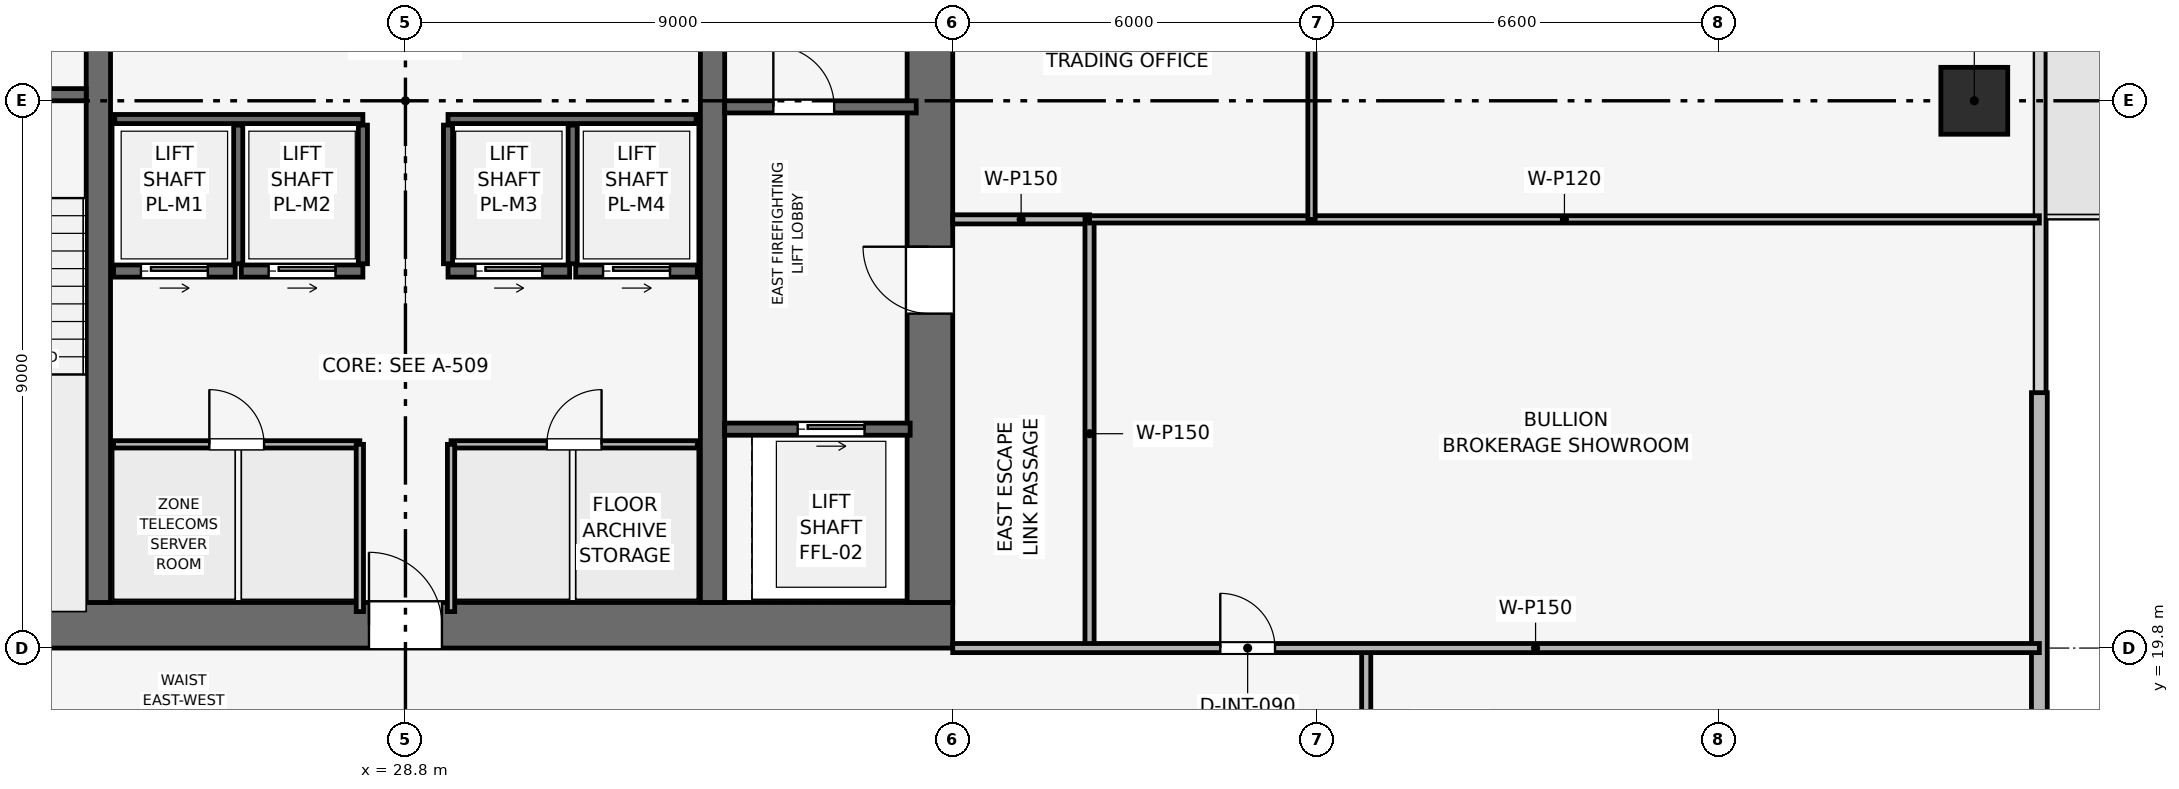
"""IFC4 building model, lengths in metres.
Left out: names, types, materials, properties, quantities, classifications, styles, units other than length and angle.
Written with IfcOpenShell. Run it as: python <this file> out.ifc"""

import sys

from ifc_helpers import new_model, si_unit, direction, frame, frame_2d, origin, origin_2d, place, context, subcontext, project, spatial, rectangle, extrude, element, fill, save


model = new_model("IFC4")
c1 = context("Model", 3, precision=1e-05, world=origin(), true_north=direction((0.0, 1.0)))
c2 = subcontext(c1, "Body", "Model", "MODEL_VIEW")
j1 = project(units=[si_unit("LENGTHUNIT", "METRE"), si_unit("PLANEANGLEUNIT", "RADIAN")], contexts=[c1])
p1 = place(None, origin())
s1 = spatial("IfcSite", under=j1, at=p1, CompositionType="ELEMENT")
p2 = place(p1, origin())
s2 = spatial("IfcBuilding", under=s1, at=p2, CompositionType="ELEMENT")
p3 = place(p2, frame((0.0, 0.0, 214.95)))
s3 = spatial("IfcBuildingStorey", under=s2, at=p3, CompositionType="ELEMENT", Elevation=214.95)
p4 = place(p3, frame((19.8, 20.175, 0.0), z_axis=(0.0, 0.0, 1.0), x_axis=(1.0, 0.0, 0.0)))
e1 = element("IfcWall", 1, at=p4, inside=s3, PredefinedType="SHEAR", context=c2, shape_type="SweptSolid", body=[
    extrude(rectangle(XDim=18.0, YDim=0.75, at=frame_2d((9.0, 0.0))), origin(), (0.0, 0.0, 1.0), 3.75),
])
p5 = place(p4, frame((8.4, 0.0, 0.0)))
e2 = element("IfcOpeningElement", 2, at=p5, cuts=e1, PredefinedType="OPENING", context=c2, shape_type="SweptSolid", body=[
    extrude(rectangle(XDim=1.2, YDim=2.2, at=frame_2d((0.6, 1.1))), frame((0.0, 0.385, 0.0), z_axis=(0.0, -1.0, 0.0), x_axis=(1.0, 0.0, 0.0)), (0.0, 0.0, 1.0), 0.77),
])
p6 = place(p3, frame((37.425, 20.55, 0.0), z_axis=(0.0, 0.0, 1.0), x_axis=(0.0, 1.0, 0.0)))
e3 = element("IfcWall", 3, at=p6, inside=s3, PredefinedType="SHEAR", context=c2, shape_type="SweptSolid", body=[
    extrude(rectangle(XDim=16.5, YDim=0.75, at=frame_2d((8.25, 0.0))), origin(), (0.0, 0.0, 1.0), 3.75),
])
p7 = place(p6, frame((4.75, 0.0, 0.0)))
e4 = element("IfcOpeningElement", 4, at=p7, cuts=e3, PredefinedType="OPENING", context=c2, shape_type="SweptSolid", body=[
    extrude(rectangle(XDim=1.1, YDim=2.15, at=frame_2d((0.55, 1.075))), frame((0.0, 0.385, 0.0), z_axis=(0.0, -1.0, 0.0), x_axis=(1.0, 0.0, 0.0)), (0.0, 0.0, 1.0), 0.77),
])
for number, where, z_axis, x_axis in (
    (5, (23.75, 20.55, 0.0), (0.0, 0.0, 1.0), (0.0, 1.0, 0.0)),
    (6, (33.85, 20.55, 0.0), (0.0, 0.0, 1.0), (0.0, 1.0, 0.0)),
):
    element("IfcWall", number, at=place(p3, frame(where, z_axis=z_axis, x_axis=x_axis)), inside=s3, PredefinedType="SHEAR", context=c2, shape_type="SweptSolid", body=[
        extrude(rectangle(XDim=16.5, YDim=0.4, at=frame_2d((8.25, 0.0))), origin(), (0.0, 0.0, 1.0), 3.75),
    ])
p8 = place(p3, frame((54.6, 28.8, 0.003), z_axis=(0.0, 0.0, 1.0), x_axis=(1.0, 0.0, 0.0)))
e7 = element("IfcColumn", 7, at=p8, inside=s3, PredefinedType="COLUMN", context=c2, shape_type="SweptSolid", body=[
    extrude(rectangle(XDim=1.1, YDim=1.1, at=origin_2d()), origin(), (0.0, 0.0, 1.0), 3.494),
])
p9 = place(p3, frame((55.67, 24.0, 0.0), z_axis=(0.0, 0.0, 1.0), x_axis=(0.0, -1.0, 0.0)))
e8 = element("IfcWall", 8, at=p9, inside=s3, PredefinedType="SOLIDWALL", context=c2, shape_type="SweptSolid", body=[
    extrude(rectangle(XDim=14.7, YDim=0.26, at=frame_2d((7.35, 0.0))), origin(), (0.0, 0.0, 1.0), 3.5),
])
p10 = place(p9, frame((10.65, 0.0, 0.9)))
e9 = element("IfcOpeningElement", 9, at=p10, cuts=e8, PredefinedType="OPENING", context=c2, shape_type="SweptSolid", body=[
    extrude(rectangle(XDim=3.8, YDim=1.9, at=frame_2d((1.9, 0.95))), frame((0.0, 0.14, 0.0), z_axis=(0.0, -1.0, 0.0), x_axis=(1.0, 0.0, 0.0)), (0.0, 0.0, 1.0), 0.28),
])
p11 = place(p3, frame((20.4, 28.9, 0.0), z_axis=(0.0, 0.0, 1.0), x_axis=(1.0, 0.0, 0.0)))
e10 = element("IfcWall", 10, at=p11, inside=s3, PredefinedType="SHEAR", context=c2, shape_type="SweptSolid", body=[
    extrude(rectangle(XDim=3.15, YDim=0.2, at=frame_2d((1.575, 0.0))), origin(), (0.0, 0.0, 1.0), 3.5),
])
p12 = place(p11, frame((0.8, 0.0, 0.0)))
e11 = element("IfcOpeningElement", 11, at=p12, cuts=e10, PredefinedType="OPENING", context=c2, shape_type="SweptSolid", body=[
    extrude(rectangle(XDim=1.0, YDim=2.1, at=frame_2d((0.5, 1.05))), frame((0.0, 0.11, 0.0), z_axis=(0.0, -1.0, 0.0), x_axis=(1.0, 0.0, 0.0)), (0.0, 0.0, 1.0), 0.22),
])
p13 = place(p3, frame((34.05, 28.7, 0.0), z_axis=(0.0, 0.0, 1.0), x_axis=(1.0, 0.0, 0.0)))
e12 = element("IfcWall", 12, at=p13, inside=s3, PredefinedType="SHEAR", context=c2, shape_type="SweptSolid", body=[
    extrude(rectangle(XDim=3.15, YDim=0.2, at=frame_2d((1.575, 0.0))), origin(), (0.0, 0.0, 1.0), 3.5),
])
p14 = place(p13, frame((0.8, 0.0, 0.0)))
e13 = element("IfcOpeningElement", 13, at=p14, cuts=e12, PredefinedType="OPENING", context=c2, shape_type="SweptSolid", body=[
    extrude(rectangle(XDim=1.0, YDim=2.1, at=frame_2d((0.5, 1.05))), frame((0.0, 0.11, 0.0), z_axis=(0.0, -1.0, 0.0), x_axis=(1.0, 0.0, 0.0)), (0.0, 0.0, 1.0), 0.22),
])
p15 = place(p3, frame((34.05, 23.4, 0.0), z_axis=(0.0, 0.0, 1.0), x_axis=(1.0, 0.0, 0.0)))
e14 = element("IfcWall", 14, at=p15, inside=s3, PredefinedType="SHEAR", context=c2, shape_type="SweptSolid", body=[
    extrude(rectangle(XDim=3.05, YDim=0.2, at=frame_2d((1.525, 0.0))), origin(), (0.0, 0.0, 1.0), 3.5),
])
p16 = place(p15, frame((1.2, 0.0, 0.0)))
e15 = element("IfcOpeningElement", 15, at=p16, cuts=e14, PredefinedType="OPENING", context=c2, shape_type="SweptSolid", body=[
    extrude(rectangle(XDim=1.1, YDim=2.15, at=frame_2d((0.55, 1.075))), frame((0.0, 0.11, 0.0), z_axis=(0.0, -1.0, 0.0), x_axis=(1.0, 0.0, 0.0)), (0.0, 0.0, 1.0), 0.22),
])
p17 = place(p3, frame((24.0, 26.0, 0.0), z_axis=(0.0, 0.0, 1.0), x_axis=(1.0, 0.0, 0.0)))
e16 = element("IfcWall", 16, at=p17, inside=s3, PredefinedType="SHEAR", context=c2, shape_type="SweptSolid", body=[
    extrude(rectangle(XDim=2.0, YDim=0.2, at=frame_2d((1.0, 0.0))), origin(), (0.0, 0.0, 1.0), 3.5),
])
p18 = place(p17, frame((0.45, 0.0, 0.0)))
e17 = element("IfcOpeningElement", 17, at=p18, cuts=e16, PredefinedType="OPENING", context=c2, shape_type="SweptSolid", body=[
    extrude(rectangle(XDim=1.1, YDim=2.15, at=frame_2d((0.55, 1.075))), frame((0.0, 0.11, 0.0), z_axis=(0.0, -1.0, 0.0), x_axis=(1.0, 0.0, 0.0)), (0.0, 0.0, 1.0), 0.22),
])
p19 = place(p3, frame((26.1, 26.0, 0.0), z_axis=(0.0, 0.0, 1.0), x_axis=(1.0, 0.0, 0.0)))
e18 = element("IfcWall", 18, at=p19, inside=s3, PredefinedType="SHEAR", context=c2, shape_type="SweptSolid", body=[
    extrude(rectangle(XDim=2.0, YDim=0.2, at=frame_2d((1.0, 0.0))), origin(), (0.0, 0.0, 1.0), 3.5),
])
p20 = place(p19, frame((0.45, 0.0, 0.0)))
e19 = element("IfcOpeningElement", 19, at=p20, cuts=e18, PredefinedType="OPENING", context=c2, shape_type="SweptSolid", body=[
    extrude(rectangle(XDim=1.1, YDim=2.15, at=frame_2d((0.55, 1.075))), frame((0.0, 0.11, 0.0), z_axis=(0.0, -1.0, 0.0), x_axis=(1.0, 0.0, 0.0)), (0.0, 0.0, 1.0), 0.22),
])
p21 = place(p3, frame((29.5, 26.0, 0.0), z_axis=(0.0, 0.0, 1.0), x_axis=(1.0, 0.0, 0.0)))
e20 = element("IfcWall", 20, at=p21, inside=s3, PredefinedType="SHEAR", context=c2, shape_type="SweptSolid", body=[
    extrude(rectangle(XDim=2.0, YDim=0.2, at=frame_2d((1.0, 0.0))), origin(), (0.0, 0.0, 1.0), 3.5),
])
p22 = place(p21, frame((0.45, 0.0, 0.0)))
e21 = element("IfcOpeningElement", 21, at=p22, cuts=e20, PredefinedType="OPENING", context=c2, shape_type="SweptSolid", body=[
    extrude(rectangle(XDim=1.1, YDim=2.15, at=frame_2d((0.55, 1.075))), frame((0.0, 0.11, 0.0), z_axis=(0.0, -1.0, 0.0), x_axis=(1.0, 0.0, 0.0)), (0.0, 0.0, 1.0), 0.22),
])
p23 = place(p3, frame((31.6, 26.0, 0.0), z_axis=(0.0, 0.0, 1.0), x_axis=(1.0, 0.0, 0.0)))
e22 = element("IfcWall", 22, at=p23, inside=s3, PredefinedType="SHEAR", context=c2, shape_type="SweptSolid", body=[
    extrude(rectangle(XDim=2.0, YDim=0.2, at=frame_2d((1.0, 0.0))), origin(), (0.0, 0.0, 1.0), 3.5),
])
p24 = place(p23, frame((0.45, 0.0, 0.0)))
e23 = element("IfcOpeningElement", 23, at=p24, cuts=e22, PredefinedType="OPENING", context=c2, shape_type="SweptSolid", body=[
    extrude(rectangle(XDim=1.1, YDim=2.15, at=frame_2d((0.55, 1.075))), frame((0.0, 0.11, 0.0), z_axis=(0.0, -1.0, 0.0), x_axis=(1.0, 0.0, 0.0)), (0.0, 0.0, 1.0), 0.22),
])
for number, where, z_axis, x_axis in (
    (24, (24.02, 28.5, 0.0), (0.0, 0.0, 1.0), (1.0, 0.0, 0.0)),
    (25, (29.5, 28.5, 0.0), (0.0, 0.0, 1.0), (1.0, 0.0, 0.0)),
):
    element("IfcWall", number, at=place(p3, frame(where, z_axis=z_axis, x_axis=x_axis)), inside=s3, PredefinedType="SHEAR", context=c2, shape_type="SweptSolid", body=[
        extrude(rectangle(XDim=4.08, YDim=0.15, at=frame_2d((2.04, 0.0))), origin(), (0.0, 0.0, 1.0), 3.5),
    ])
for number, where, z_axis, x_axis in (
    (26, (26.05, 26.12, 0.0), (0.0, 0.0, 1.0), (0.0, 1.0, 0.0)),
    (27, (28.1, 26.12, 0.0), (0.0, 0.0, 1.0), (0.0, 1.0, 0.0)),
    (28, (29.5, 26.12, 0.0), (0.0, 0.0, 1.0), (0.0, 1.0, 0.0)),
    (29, (31.55, 26.12, 0.0), (0.0, 0.0, 1.0), (0.0, 1.0, 0.0)),
):
    element("IfcWall", number, at=place(p3, frame(where, z_axis=z_axis, x_axis=x_axis)), inside=s3, PredefinedType="SHEAR", context=c2, shape_type="SweptSolid", body=[
        extrude(rectangle(XDim=2.28, YDim=0.15, at=frame_2d((1.14, 0.0))), origin(), (0.0, 0.0, 1.0), 3.5),
    ])
p25 = place(p3, frame((24.0, 23.15, 0.0), z_axis=(0.0, 0.0, 1.0), x_axis=(1.0, 0.0, 0.0)))
e30 = element("IfcWall", 30, at=p25, inside=s3, PredefinedType="PARTITIONING", context=c2, shape_type="SweptSolid", body=[
    extrude(rectangle(XDim=4.05, YDim=0.12, at=frame_2d((2.025, 0.0))), origin(), (0.0, 0.0, 1.0), 3.5),
])
p26 = place(p25, frame((1.575, 0.0, 0.0)))
e31 = element("IfcOpeningElement", 31, at=p26, cuts=e30, PredefinedType="OPENING", context=c2, shape_type="SweptSolid", body=[
    extrude(rectangle(XDim=0.9, YDim=2.1, at=frame_2d((0.45, 1.05))), frame((0.0, 0.07, 0.0), z_axis=(0.0, -1.0, 0.0), x_axis=(1.0, 0.0, 0.0)), (0.0, 0.0, 1.0), 0.14),
])
p27 = place(p3, frame((28.05, 20.4, 0.0), z_axis=(0.0, 0.0, 1.0), x_axis=(0.0, 1.0, 0.0)))
e32 = element("IfcWall", 32, at=p27, inside=s3, PredefinedType="PARTITIONING", context=c2, shape_type="SweptSolid", body=[
    extrude(rectangle(XDim=2.75, YDim=0.12, at=frame_2d((1.375, 0.0))), origin(), (0.0, 0.0, 1.0), 3.5),
])
p28 = place(p3, frame((29.55, 23.15, 0.0), z_axis=(0.0, 0.0, 1.0), x_axis=(1.0, 0.0, 0.0)))
e33 = element("IfcWall", 33, at=p28, inside=s3, PredefinedType="PARTITIONING", context=c2, shape_type="SweptSolid", body=[
    extrude(rectangle(XDim=4.05, YDim=0.12, at=frame_2d((2.025, 0.0))), origin(), (0.0, 0.0, 1.0), 3.5),
])
p29 = place(p28, frame((1.575, 0.0, 0.0)))
e34 = element("IfcOpeningElement", 34, at=p29, cuts=e33, PredefinedType="OPENING", context=c2, shape_type="SweptSolid", body=[
    extrude(rectangle(XDim=0.9, YDim=2.1, at=frame_2d((0.45, 1.05))), frame((0.0, 0.07, 0.0), z_axis=(0.0, -1.0, 0.0), x_axis=(1.0, 0.0, 0.0)), (0.0, 0.0, 1.0), 0.14),
])
p30 = place(p3, frame((29.55, 20.4, 0.0), z_axis=(0.0, 0.0, 1.0), x_axis=(0.0, 1.0, 0.0)))
e35 = element("IfcWall", 35, at=p30, inside=s3, PredefinedType="PARTITIONING", context=c2, shape_type="SweptSolid", body=[
    extrude(rectangle(XDim=2.75, YDim=0.12, at=frame_2d((1.375, 0.0))), origin(), (0.0, 0.0, 1.0), 3.5),
])
p31 = place(p3, frame((37.8, 26.85, 0.0), z_axis=(0.0, 0.0, 1.0), x_axis=(1.0, 0.0, 0.0)))
e36 = element("IfcWall", 36, at=p31, inside=s3, PredefinedType="PARTITIONING", context=c2, shape_type="SweptSolid", body=[
    extrude(rectangle(XDim=2.25, YDim=0.15, at=frame_2d((1.125, 0.0))), origin(), (0.0, 0.0, 1.0), 3.5),
])
p32 = place(p3, frame((40.05, 19.8, 0.0), z_axis=(0.0, 0.0, 1.0), x_axis=(0.0, 1.0, 0.0)))
e37 = element("IfcWall", 37, at=p32, inside=s3, PredefinedType="PARTITIONING", context=c2, shape_type="SweptSolid", body=[
    extrude(rectangle(XDim=7.05, YDim=0.15, at=frame_2d((3.525, 0.0))), origin(), (0.0, 0.0, 1.0), 3.035),
])
p33 = place(p3, frame((40.05, 26.85, 0.0), z_axis=(0.0, 0.0, 1.0), x_axis=(1.0, 0.0, 0.0)))
e38 = element("IfcWall", 38, at=p33, inside=s3, PredefinedType="PARTITIONING", context=c2, shape_type="SweptSolid", body=[
    extrude(rectangle(XDim=15.62, YDim=0.12, at=frame_2d((7.81, 0.0))), origin(), (0.0, 0.0, 1.0), 2.885),
])
p34 = place(p3, frame((43.7, 26.85, 0.0), z_axis=(0.0, 0.0, 1.0), x_axis=(0.0, 1.0, 0.0)))
e39 = element("IfcWall", 39, at=p34, inside=s3, PredefinedType="PARTITIONING", context=c2, shape_type="SweptSolid", body=[
    extrude(rectangle(XDim=10.95, YDim=0.12, at=frame_2d((5.475, 0.0))), origin(), (0.0, 0.0, 1.0), 3.035),
])
p35 = place(p34, frame((5.025, 0.0, 0.0)))
e40 = element("IfcOpeningElement", 40, at=p35, cuts=e39, PredefinedType="OPENING", context=c2, shape_type="SweptSolid", body=[
    extrude(rectangle(XDim=0.9, YDim=2.1, at=frame_2d((0.45, 1.05))), frame((0.0, 0.07, 0.0), z_axis=(0.0, -1.0, 0.0), x_axis=(1.0, 0.0, 0.0)), (0.0, 0.0, 1.0), 0.14),
])
p36 = place(p3, frame((44.6, 17.4, 0.0), z_axis=(0.0, 0.0, 1.0), x_axis=(0.0, 1.0, 0.0)))
e41 = element("IfcWall", 41, at=p36, inside=s3, PredefinedType="PARTITIONING", context=c2, shape_type="SweptSolid", body=[
    extrude(rectangle(XDim=2.4, YDim=0.15, at=frame_2d((1.2, 0.0))), origin(), (0.0, 0.0, 1.0), 3.5),
])
p37 = place(p3, frame((37.8, 19.8, 0.0), z_axis=(0.0, 0.0, 1.0), x_axis=(1.0, 0.0, 0.0)))
e42 = element("IfcWall", 42, at=p37, inside=s3, PredefinedType="PARTITIONING", context=c2, shape_type="SweptSolid", body=[
    extrude(rectangle(XDim=17.87, YDim=0.15, at=frame_2d((8.935, 0.0))), origin(), (0.0, 0.0, 1.0), 2.885),
])
p38 = place(p37, frame((4.4, 0.0, 0.0)))
e43 = element("IfcOpeningElement", 43, at=p38, cuts=e42, PredefinedType="OPENING", context=c2, shape_type="SweptSolid", body=[
    extrude(rectangle(XDim=0.9, YDim=2.1, at=frame_2d((0.45, 1.05))), frame((0.0, 0.085, 0.0), z_axis=(0.0, -1.0, 0.0), x_axis=(1.0, 0.0, 0.0)), (0.0, 0.0, 1.0), 0.17),
])
p39 = place(p14, origin())
e44 = element("IfcDoor", 44, at=p39, inside=s3, OperationType="SINGLE_SWING_LEFT", PredefinedType="DOOR", context=c2, shape_type="SweptSolid", body=[
    extrude(rectangle(XDim=1.0, YDim=2.1, at=frame_2d((0.5, 1.05))), frame((0.0, 0.025, 0.0), z_axis=(0.0, -1.0, 0.0), x_axis=(1.0, 0.0, 0.0)), (0.0, 0.0, 1.0), 0.05),
])
fill(e13, e44)
p40 = place(p16, origin())
e45 = element("IfcDoor", 45, at=p40, inside=s3, OperationType="SLIDING_TO_RIGHT", PredefinedType="DOOR", context=c2, shape_type="SweptSolid", body=[
    extrude(rectangle(XDim=1.1, YDim=2.15, at=frame_2d((0.55, 1.075))), frame((0.0, 0.025, 0.0), z_axis=(0.0, -1.0, 0.0), x_axis=(1.0, 0.0, 0.0)), (0.0, 0.0, 1.0), 0.05),
])
fill(e15, e45)
p41 = place(p18, origin())
e46 = element("IfcDoor", 46, at=p41, inside=s3, OperationType="SLIDING_TO_RIGHT", PredefinedType="DOOR", context=c2, shape_type="SweptSolid", body=[
    extrude(rectangle(XDim=1.1, YDim=2.15, at=frame_2d((0.55, 1.075))), frame((0.0, 0.025, 0.0), z_axis=(0.0, -1.0, 0.0), x_axis=(1.0, 0.0, 0.0)), (0.0, 0.0, 1.0), 0.05),
])
fill(e17, e46)
p42 = place(p20, origin())
e47 = element("IfcDoor", 47, at=p42, inside=s3, OperationType="SLIDING_TO_RIGHT", PredefinedType="DOOR", context=c2, shape_type="SweptSolid", body=[
    extrude(rectangle(XDim=1.1, YDim=2.15, at=frame_2d((0.55, 1.075))), frame((0.0, 0.025, 0.0), z_axis=(0.0, -1.0, 0.0), x_axis=(1.0, 0.0, 0.0)), (0.0, 0.0, 1.0), 0.05),
])
fill(e19, e47)
p43 = place(p22, origin())
e48 = element("IfcDoor", 48, at=p43, inside=s3, OperationType="SLIDING_TO_RIGHT", PredefinedType="DOOR", context=c2, shape_type="SweptSolid", body=[
    extrude(rectangle(XDim=1.1, YDim=2.15, at=frame_2d((0.55, 1.075))), frame((0.0, 0.025, 0.0), z_axis=(0.0, -1.0, 0.0), x_axis=(1.0, 0.0, 0.0)), (0.0, 0.0, 1.0), 0.05),
])
fill(e21, e48)
p44 = place(p24, origin())
e49 = element("IfcDoor", 49, at=p44, inside=s3, OperationType="SLIDING_TO_RIGHT", PredefinedType="DOOR", context=c2, shape_type="SweptSolid", body=[
    extrude(rectangle(XDim=1.1, YDim=2.15, at=frame_2d((0.55, 1.075))), frame((0.0, 0.025, 0.0), z_axis=(0.0, -1.0, 0.0), x_axis=(1.0, 0.0, 0.0)), (0.0, 0.0, 1.0), 0.05),
])
fill(e23, e49)
p45 = place(p26, origin())
e50 = element("IfcDoor", 50, at=p45, inside=s3, OperationType="SINGLE_SWING_LEFT", PredefinedType="DOOR", context=c2, shape_type="SweptSolid", body=[
    extrude(rectangle(XDim=0.9, YDim=2.1, at=frame_2d((0.45, 1.05))), frame((0.0, 0.025, 0.0), z_axis=(0.0, -1.0, 0.0), x_axis=(1.0, 0.0, 0.0)), (0.0, 0.0, 1.0), 0.05),
])
fill(e31, e50)
p46 = place(p29, origin())
e51 = element("IfcDoor", 51, at=p46, inside=s3, OperationType="SINGLE_SWING_RIGHT", PredefinedType="DOOR", context=c2, shape_type="SweptSolid", body=[
    extrude(rectangle(XDim=0.9, YDim=2.1, at=frame_2d((0.45, 1.05))), frame((0.0, 0.025, 0.0), z_axis=(0.0, -1.0, 0.0), x_axis=(1.0, 0.0, 0.0)), (0.0, 0.0, 1.0), 0.05),
])
fill(e34, e51)
p47 = place(p38, origin())
e52 = element("IfcDoor", 52, at=p47, inside=s3, OperationType="SINGLE_SWING_LEFT", PredefinedType="DOOR", context=c2, shape_type="SweptSolid", body=[
    extrude(rectangle(XDim=0.9, YDim=2.1, at=frame_2d((0.45, 1.05))), frame((0.0, 0.025, 0.0), z_axis=(0.0, -1.0, 0.0), x_axis=(1.0, 0.0, 0.0)), (0.0, 0.0, 1.0), 0.05),
])
fill(e43, e52)
p48 = place(p7, origin())
e53 = element("IfcDoor", 53, at=p48, inside=s3, OperationType="SINGLE_SWING_RIGHT", PredefinedType="DOOR", context=c2, shape_type="SweptSolid", body=[
    extrude(rectangle(XDim=1.1, YDim=2.15, at=frame_2d((0.55, 1.075))), frame((0.0, 0.025, 0.0), z_axis=(0.0, -1.0, 0.0), x_axis=(1.0, 0.0, 0.0)), (0.0, 0.0, 1.0), 0.05),
])
fill(e4, e53)
p49 = place(p5, origin())
e54 = element("IfcDoor", 54, at=p49, inside=s3, OperationType="SINGLE_SWING_LEFT", PredefinedType="DOOR", context=c2, shape_type="SweptSolid", body=[
    extrude(rectangle(XDim=1.2, YDim=2.2, at=frame_2d((0.6, 1.1))), frame((0.0, 0.025, 0.0), z_axis=(0.0, -1.0, 0.0), x_axis=(1.0, 0.0, 0.0)), (0.0, 0.0, 1.0), 0.05),
])
fill(e2, e54)
save(model, sys.argv[1])
